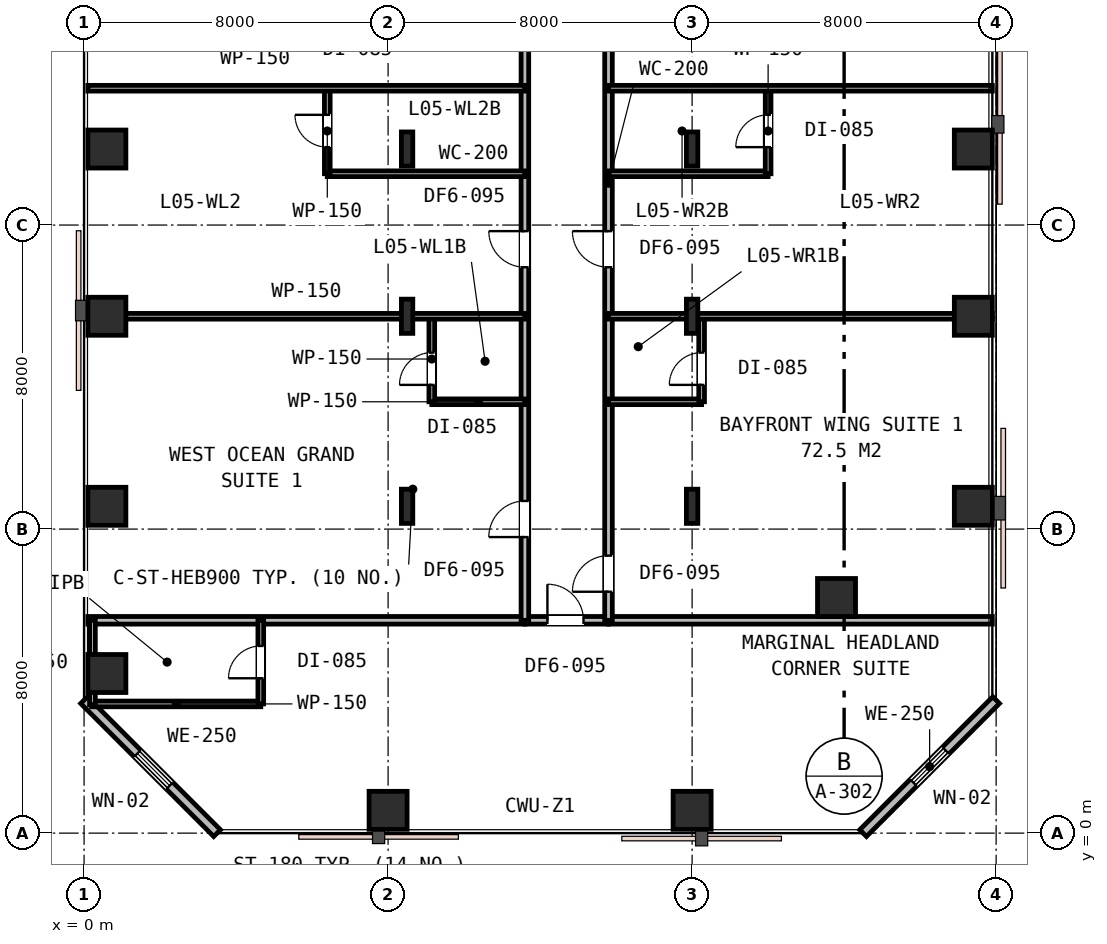
"""IFC4 building model, lengths in metres.
Left out: names, types, materials, properties, quantities, classifications, styles, units other than length and angle.
Written with IfcOpenShell. Run it as: python <this file> out.ifc"""

import sys

from ifc_helpers import new_model, si_unit, direction, frame, frame_2d, origin, origin_2d, place, context, subcontext, project, spatial, rectangle, i_section, extrude, element, fill, save


model = new_model("IFC4")
c1 = context("Model", 3, precision=1e-05, world=origin(), true_north=direction((0.0, 1.0)))
c2 = subcontext(c1, "Body", "Model", "MODEL_VIEW")
j1 = project(units=[si_unit("LENGTHUNIT", "METRE"), si_unit("PLANEANGLEUNIT", "RADIAN")], contexts=[c1])
p1 = place(None, origin())
s1 = spatial("IfcSite", under=j1, at=p1, CompositionType="ELEMENT")
p2 = place(p1, origin())
s2 = spatial("IfcBuilding", under=s1, at=p2, CompositionType="ELEMENT")
p3 = place(p2, frame((0.0, 0.0, 25.8)))
s3 = spatial("IfcBuildingStorey", under=s2, at=p3, CompositionType="ELEMENT", Elevation=25.8)
for number, where, z_axis, x_axis in (
    (1, (0.6, 8.6, 0.0), (0.0, 0.0, 1.0), (1.0, 0.0, 0.0)),
    (2, (0.6, 13.6, 0.0), (0.0, 0.0, 1.0), (1.0, 0.0, 0.0)),
    (3, (0.6, 18.0, 0.0), (0.0, 0.0, 1.0), (1.0, 0.0, 0.0)),
    (4, (0.6, 4.2, 0.0), (0.0, 0.0, 1.0), (1.0, 0.0, 0.0)),
    (5, (8.0, 0.6, 0.0), (0.0, 0.0, 1.0), (1.0, 0.0, 0.0)),
    (6, (16.0, 0.6, 0.0), (0.0, 0.0, 1.0), (1.0, 0.0, 0.0)),
    (7, (19.8, 6.2, 0.0), (0.0, 0.0, 1.0), (1.0, 0.0, 0.0)),
    (8, (23.4, 8.6, 0.0), (0.0, 0.0, 1.0), (1.0, 0.0, 0.0)),
    (9, (23.4, 13.6, 0.0), (0.0, 0.0, 1.0), (1.0, 0.0, 0.0)),
    (10, (23.4, 18.0, 0.0), (0.0, 0.0, 1.0), (1.0, 0.0, 0.0)),
):
    element("IfcColumn", number, at=place(p3, frame(where, z_axis=z_axis, x_axis=x_axis)), inside=s3, PredefinedType="COLUMN", context=c2, shape_type="SweptSolid", body=[
        extrude(rectangle(XDim=1.0, YDim=1.0, at=origin_2d()), origin(), (0.0, 0.0, 1.0), 3.6),
    ])
for number, where, z_axis, x_axis in (
    (11, (8.5, 8.6, 0.0), (0.0, 0.0, 1.0), (1.0, 0.0, 0.0)),
    (12, (16.0, 8.6, 0.0), (0.0, 0.0, 1.0), (1.0, 0.0, 0.0)),
    (13, (8.5, 13.6, 0.0), (0.0, 0.0, 1.0), (1.0, 0.0, 0.0)),
    (14, (16.0, 13.6, 0.0), (0.0, 0.0, 1.0), (1.0, 0.0, 0.0)),
    (15, (8.5, 18.0, 0.0), (0.0, 0.0, 1.0), (1.0, 0.0, 0.0)),
    (16, (16.0, 18.0, 0.0), (0.0, 0.0, 1.0), (1.0, 0.0, 0.0)),
):
    element("IfcColumn", number, at=place(p3, frame(where, z_axis=z_axis, x_axis=x_axis)), inside=s3, PredefinedType="COLUMN", context=c2, shape_type="SweptSolid", body=[
        extrude(i_section(OverallWidth=0.3, OverallDepth=0.9, WebThickness=0.018, FlangeThickness=0.035, FilletRadius=0.03, at=origin_2d()), origin(), (0.0, 0.0, 1.0), 3.6),
    ])
p4 = place(p3, frame((20.5, 0.0, 0.0), z_axis=(0.0, 0.0, 1.0), x_axis=(0.707106781187, 0.707106781187, 0.0)))
e17 = element("IfcWall", 17, at=p4, inside=s3, PredefinedType="STANDARD", context=c2, shape_type="SweptSolid", body=[
    extrude(rectangle(XDim=4.95, YDim=0.25, at=frame_2d((2.475, 0.0))), origin(), (0.0, 0.0, 1.0), 3.33),
])
p5 = place(p4, frame((1.875, 0.0, 0.85)))
e18 = element("IfcOpeningElement", 18, at=p5, cuts=e17, PredefinedType="OPENING", context=c2, shape_type="SweptSolid", body=[
    extrude(rectangle(XDim=1.2, YDim=1.6, at=frame_2d((0.6, 0.8))), frame((0.0, 0.135, 0.0), z_axis=(0.0, -1.0, 0.0), x_axis=(1.0, 0.0, 0.0)), (0.0, 0.0, 1.0), 0.27),
])
p6 = place(p3, frame((0.0, 3.5, 0.0), z_axis=(0.0, 0.0, 1.0), x_axis=(0.707106781187, -0.707106781187, 0.0)))
e19 = element("IfcWall", 19, at=p6, inside=s3, PredefinedType="STANDARD", context=c2, shape_type="SweptSolid", body=[
    extrude(rectangle(XDim=4.95, YDim=0.25, at=frame_2d((2.475, 0.0))), origin(), (0.0, 0.0, 1.0), 3.33),
])
p7 = place(p6, frame((1.985, 0.0, 0.85)))
e20 = element("IfcOpeningElement", 20, at=p7, cuts=e19, PredefinedType="OPENING", context=c2, shape_type="SweptSolid", body=[
    extrude(rectangle(XDim=1.2, YDim=1.6, at=frame_2d((0.6, 0.8))), frame((0.0, 0.135, 0.0), z_axis=(0.0, -1.0, 0.0), x_axis=(1.0, 0.0, 0.0)), (0.0, 0.0, 1.0), 0.27),
])
p8 = place(p3, frame((0.1, 5.6, 0.0), z_axis=(0.0, 0.0, 1.0), x_axis=(1.0, 0.0, 0.0)))
e21 = element("IfcWall", 21, at=p8, inside=s3, PredefinedType="PARTITIONING", context=c2, shape_type="SweptSolid", body=[
    extrude(rectangle(XDim=11.5, YDim=0.2, at=frame_2d((5.75, 0.0))), origin(), (0.0, 0.0, 1.0), 2.87),
])
p9 = place(p3, frame((13.8, 5.6, 0.0), z_axis=(0.0, 0.0, 1.0), x_axis=(1.0, 0.0, 0.0)))
e22 = element("IfcWall", 22, at=p9, inside=s3, PredefinedType="PARTITIONING", context=c2, shape_type="SweptSolid", body=[
    extrude(rectangle(XDim=10.1, YDim=0.2, at=frame_2d((5.05, 0.0))), origin(), (0.0, 0.0, 1.0), 2.68),
])
p10 = place(p3, frame((11.6, 5.6, 0.0), z_axis=(0.0, 0.0, 1.0), x_axis=(1.0, 0.0, 0.0)))
e23 = element("IfcWall", 23, at=p10, inside=s3, PredefinedType="PARTITIONING", context=c2, shape_type="SweptSolid", body=[
    extrude(rectangle(XDim=2.2, YDim=0.2, at=frame_2d((1.1, 0.0))), origin(), (0.0, 0.0, 1.0), 3.33),
])
p11 = place(p10, frame((0.593, 0.0, 0.0)))
e24 = element("IfcOpeningElement", 24, at=p11, cuts=e23, PredefinedType="OPENING", context=c2, shape_type="SweptSolid", body=[
    extrude(rectangle(XDim=0.95, YDim=2.15, at=frame_2d((0.475, 1.075))), frame((0.0, 0.11, 0.0), z_axis=(0.0, -1.0, 0.0), x_axis=(1.0, 0.0, 0.0)), (0.0, 0.0, 1.0), 0.22),
])
p12 = place(p3, frame((0.2, 3.4, 0.0), z_axis=(0.0, 0.0, 1.0), x_axis=(1.0, 0.0, 0.0)))
e25 = element("IfcWall", 25, at=p12, inside=s3, PredefinedType="PARTITIONING", context=c2, shape_type="SweptSolid", body=[
    extrude(rectangle(XDim=4.45, YDim=0.15, at=frame_2d((2.225, 0.0))), origin(), (0.0, 0.0, 1.0), 3.33),
])
p13 = place(p3, frame((4.65, 3.4, 0.0), z_axis=(0.0, 0.0, 1.0), x_axis=(0.0, 1.0, 0.0)))
e26 = element("IfcWall", 26, at=p13, inside=s3, PredefinedType="PARTITIONING", context=c2, shape_type="SweptSolid", body=[
    extrude(rectangle(XDim=2.2, YDim=0.15, at=frame_2d((1.1, 0.0))), origin(), (0.0, 0.0, 1.0), 3.33),
])
p14 = place(p13, frame((0.675, 0.0, 0.0)))
e27 = element("IfcOpeningElement", 27, at=p14, cuts=e26, PredefinedType="OPENING", context=c2, shape_type="SweptSolid", body=[
    extrude(rectangle(XDim=0.85, YDim=2.15, at=frame_2d((0.425, 1.075))), frame((0.0, 0.085, 0.0), z_axis=(0.0, -1.0, 0.0), x_axis=(1.0, 0.0, 0.0)), (0.0, 0.0, 1.0), 0.17),
])
p15 = place(p3, frame((0.22, 3.38, 0.0), z_axis=(0.0, 0.0, 1.0), x_axis=(0.0, 1.0, 0.0)))
e28 = element("IfcWall", 28, at=p15, inside=s3, PredefinedType="PARTITIONING", context=c2, shape_type="SweptSolid", body=[
    extrude(rectangle(XDim=2.22, YDim=0.15, at=frame_2d((1.11, 0.0))), origin(), (0.0, 0.0, 1.0), 2.87),
])
p16 = place(p3, frame((11.6, 5.6, 0.0), z_axis=(0.0, 0.0, 1.0), x_axis=(0.0, 1.0, 0.0)))
e29 = element("IfcWall", 29, at=p16, inside=s3, PredefinedType="PARTITIONING", context=c2, shape_type="SweptSolid", body=[
    extrude(rectangle(XDim=23.0, YDim=0.2, at=frame_2d((11.5, 0.0))), origin(), (0.0, 0.0, 1.0), 2.68),
])
p17 = place(p16, frame((2.19, 0.0, 0.0)))
e30 = element("IfcOpeningElement", 30, at=p17, cuts=e29, PredefinedType="OPENING", context=c2, shape_type="SweptSolid", body=[
    extrude(rectangle(XDim=0.95, YDim=2.15, at=frame_2d((0.475, 1.075))), frame((0.0, 0.11, 0.0), z_axis=(0.0, -1.0, 0.0), x_axis=(1.0, 0.0, 0.0)), (0.0, 0.0, 1.0), 0.22),
])
p18 = place(p16, frame((9.29, 0.0, 0.0)))
e31 = element("IfcOpeningElement", 31, at=p18, cuts=e29, PredefinedType="OPENING", context=c2, shape_type="SweptSolid", body=[
    extrude(rectangle(XDim=0.95, YDim=2.15, at=frame_2d((0.475, 1.075))), frame((0.0, 0.11, 0.0), z_axis=(0.0, -1.0, 0.0), x_axis=(1.0, 0.0, 0.0)), (0.0, 0.0, 1.0), 0.22),
])
p19 = place(p16, frame((16.64, 0.0, 0.0)))
e32 = element("IfcOpeningElement", 32, at=p19, cuts=e29, PredefinedType="OPENING", context=c2, shape_type="SweptSolid", body=[
    extrude(rectangle(XDim=0.95, YDim=2.15, at=frame_2d((0.475, 1.075))), frame((0.0, 0.11, 0.0), z_axis=(0.0, -1.0, 0.0), x_axis=(1.0, 0.0, 0.0)), (0.0, 0.0, 1.0), 0.22),
])
p20 = place(p3, frame((9.15, 11.35, 0.0), z_axis=(0.0, 0.0, 1.0), x_axis=(1.0, 0.0, 0.0)))
e33 = element("IfcWall", 33, at=p20, inside=s3, PredefinedType="PARTITIONING", context=c2, shape_type="SweptSolid", body=[
    extrude(rectangle(XDim=2.45, YDim=0.15, at=frame_2d((1.225, 0.0))), origin(), (0.0, 0.0, 1.0), 2.92),
])
p21 = place(p3, frame((9.15, 11.35, 0.0), z_axis=(0.0, 0.0, 1.0), x_axis=(0.0, 1.0, 0.0)))
e34 = element("IfcWall", 34, at=p21, inside=s3, PredefinedType="PARTITIONING", context=c2, shape_type="SweptSolid", body=[
    extrude(rectangle(XDim=2.25, YDim=0.15, at=frame_2d((1.125, 0.0))), origin(), (0.0, 0.0, 1.0), 2.68),
])
p22 = place(p21, frame((0.444, 0.0, 0.0)))
e35 = element("IfcOpeningElement", 35, at=p22, cuts=e34, PredefinedType="OPENING", context=c2, shape_type="SweptSolid", body=[
    extrude(rectangle(XDim=0.85, YDim=2.15, at=frame_2d((0.425, 1.075))), frame((0.0, 0.085, 0.0), z_axis=(0.0, -1.0, 0.0), x_axis=(1.0, 0.0, 0.0)), (0.0, 0.0, 1.0), 0.17),
])
p23 = place(p3, frame((0.1, 13.6, 0.0), z_axis=(0.0, 0.0, 1.0), x_axis=(1.0, 0.0, 0.0)))
e36 = element("IfcWall", 36, at=p23, inside=s3, PredefinedType="PARTITIONING", context=c2, shape_type="SweptSolid", body=[
    extrude(rectangle(XDim=11.5, YDim=0.15, at=frame_2d((5.75, 0.0))), origin(), (0.0, 0.0, 1.0), 2.68),
])
p24 = place(p3, frame((13.8, 5.6, 0.0), z_axis=(0.0, 0.0, 1.0), x_axis=(0.0, 1.0, 0.0)))
e37 = element("IfcWall", 37, at=p24, inside=s3, PredefinedType="PARTITIONING", context=c2, shape_type="SweptSolid", body=[
    extrude(rectangle(XDim=23.0, YDim=0.2, at=frame_2d((11.5, 0.0))), origin(), (0.0, 0.0, 1.0), 2.68),
])
p25 = place(p24, frame((0.752, 0.0, 0.0)))
e38 = element("IfcOpeningElement", 38, at=p25, cuts=e37, PredefinedType="OPENING", context=c2, shape_type="SweptSolid", body=[
    extrude(rectangle(XDim=0.95, YDim=2.15, at=frame_2d((0.475, 1.075))), frame((0.0, 0.11, 0.0), z_axis=(0.0, -1.0, 0.0), x_axis=(1.0, 0.0, 0.0)), (0.0, 0.0, 1.0), 0.22),
])
p26 = place(p24, frame((9.29, 0.0, 0.0)))
e39 = element("IfcOpeningElement", 39, at=p26, cuts=e37, PredefinedType="OPENING", context=c2, shape_type="SweptSolid", body=[
    extrude(rectangle(XDim=0.95, YDim=2.15, at=frame_2d((0.475, 1.075))), frame((0.0, 0.11, 0.0), z_axis=(0.0, -1.0, 0.0), x_axis=(1.0, 0.0, 0.0)), (0.0, 0.0, 1.0), 0.22),
])
p27 = place(p24, frame((16.494, 0.0, 0.0)))
e40 = element("IfcOpeningElement", 40, at=p27, cuts=e37, PredefinedType="OPENING", context=c2, shape_type="SweptSolid", body=[
    extrude(rectangle(XDim=0.95, YDim=2.15, at=frame_2d((0.475, 1.075))), frame((0.0, 0.11, 0.0), z_axis=(0.0, -1.0, 0.0), x_axis=(1.0, 0.0, 0.0)), (0.0, 0.0, 1.0), 0.22),
])
p28 = place(p3, frame((13.8, 11.35, 0.0), z_axis=(0.0, 0.0, 1.0), x_axis=(1.0, 0.0, 0.0)))
e41 = element("IfcWall", 41, at=p28, inside=s3, PredefinedType="PARTITIONING", context=c2, shape_type="SweptSolid", body=[
    extrude(rectangle(XDim=2.45, YDim=0.15, at=frame_2d((1.225, 0.0))), origin(), (0.0, 0.0, 1.0), 2.68),
])
p29 = place(p3, frame((16.25, 11.35, 0.0), z_axis=(0.0, 0.0, 1.0), x_axis=(0.0, 1.0, 0.0)))
e42 = element("IfcWall", 42, at=p29, inside=s3, PredefinedType="PARTITIONING", context=c2, shape_type="SweptSolid", body=[
    extrude(rectangle(XDim=2.25, YDim=0.15, at=frame_2d((1.125, 0.0))), origin(), (0.0, 0.0, 1.0), 2.68),
])
p30 = place(p29, frame((0.444, 0.0, 0.0)))
e43 = element("IfcOpeningElement", 43, at=p30, cuts=e42, PredefinedType="OPENING", context=c2, shape_type="SweptSolid", body=[
    extrude(rectangle(XDim=0.85, YDim=2.15, at=frame_2d((0.425, 1.075))), frame((0.0, 0.085, 0.0), z_axis=(0.0, -1.0, 0.0), x_axis=(1.0, 0.0, 0.0)), (0.0, 0.0, 1.0), 0.17),
])
p31 = place(p3, frame((13.8, 13.6, 0.0), z_axis=(0.0, 0.0, 1.0), x_axis=(1.0, 0.0, 0.0)))
e44 = element("IfcWall", 44, at=p31, inside=s3, PredefinedType="PARTITIONING", context=c2, shape_type="SweptSolid", body=[
    extrude(rectangle(XDim=10.1, YDim=0.15, at=frame_2d((5.05, 0.0))), origin(), (0.0, 0.0, 1.0), 2.68),
])
p32 = place(p3, frame((6.4, 17.35, 0.0), z_axis=(0.0, 0.0, 1.0), x_axis=(1.0, 0.0, 0.0)))
e45 = element("IfcWall", 45, at=p32, inside=s3, PredefinedType="PARTITIONING", context=c2, shape_type="SweptSolid", body=[
    extrude(rectangle(XDim=5.2, YDim=0.15, at=frame_2d((2.6, 0.0))), origin(), (0.0, 0.0, 1.0), 2.68),
])
p33 = place(p3, frame((6.4, 17.35, 0.0), z_axis=(0.0, 0.0, 1.0), x_axis=(0.0, 1.0, 0.0)))
e46 = element("IfcWall", 46, at=p33, inside=s3, PredefinedType="PARTITIONING", context=c2, shape_type="SweptSolid", body=[
    extrude(rectangle(XDim=2.25, YDim=0.15, at=frame_2d((1.125, 0.0))), origin(), (0.0, 0.0, 1.0), 2.68),
])
p34 = place(p33, frame((0.7, 0.0, 0.0)))
e47 = element("IfcOpeningElement", 47, at=p34, cuts=e46, PredefinedType="OPENING", context=c2, shape_type="SweptSolid", body=[
    extrude(rectangle(XDim=0.85, YDim=2.15, at=frame_2d((0.425, 1.075))), frame((0.0, 0.085, 0.0), z_axis=(0.0, -1.0, 0.0), x_axis=(1.0, 0.0, 0.0)), (0.0, 0.0, 1.0), 0.17),
])
p35 = place(p3, frame((0.1, 19.6, 0.0), z_axis=(0.0, 0.0, 1.0), x_axis=(1.0, 0.0, 0.0)))
e48 = element("IfcWall", 48, at=p35, inside=s3, PredefinedType="PARTITIONING", context=c2, shape_type="SweptSolid", body=[
    extrude(rectangle(XDim=11.5, YDim=0.15, at=frame_2d((5.75, 0.0))), origin(), (0.0, 0.0, 1.0), 2.68),
])
p36 = place(p3, frame((13.8, 17.35, 0.0), z_axis=(0.0, 0.0, 1.0), x_axis=(1.0, 0.0, 0.0)))
e49 = element("IfcWall", 49, at=p36, inside=s3, PredefinedType="PARTITIONING", context=c2, shape_type="SweptSolid", body=[
    extrude(rectangle(XDim=4.2, YDim=0.15, at=frame_2d((2.1, 0.0))), origin(), (0.0, 0.0, 1.0), 2.68),
])
p37 = place(p3, frame((18.0, 17.35, 0.0), z_axis=(0.0, 0.0, 1.0), x_axis=(0.0, 1.0, 0.0)))
e50 = element("IfcWall", 50, at=p37, inside=s3, PredefinedType="PARTITIONING", context=c2, shape_type="SweptSolid", body=[
    extrude(rectangle(XDim=2.25, YDim=0.15, at=frame_2d((1.125, 0.0))), origin(), (0.0, 0.0, 1.0), 2.68),
])
p38 = place(p37, frame((0.7, 0.0, 0.0)))
e51 = element("IfcOpeningElement", 51, at=p38, cuts=e50, PredefinedType="OPENING", context=c2, shape_type="SweptSolid", body=[
    extrude(rectangle(XDim=0.85, YDim=2.15, at=frame_2d((0.425, 1.075))), frame((0.0, 0.085, 0.0), z_axis=(0.0, -1.0, 0.0), x_axis=(1.0, 0.0, 0.0)), (0.0, 0.0, 1.0), 0.17),
])
p39 = place(p3, frame((13.8, 19.6, 0.0), z_axis=(0.0, 0.0, 1.0), x_axis=(1.0, 0.0, 0.0)))
e52 = element("IfcWall", 52, at=p39, inside=s3, PredefinedType="PARTITIONING", context=c2, shape_type="SweptSolid", body=[
    extrude(rectangle(XDim=10.1, YDim=0.15, at=frame_2d((5.05, 0.0))), origin(), (0.0, 0.0, 1.0), 2.68),
])
p40 = place(p5, origin())
e53 = element("IfcWindow", 53, at=p40, inside=s3, PartitioningType="SINGLE_PANEL", PredefinedType="WINDOW", context=c2, shape_type="SweptSolid", body=[
    extrude(rectangle(XDim=1.2, YDim=1.6, at=frame_2d((0.6, 0.8))), frame((0.0, 0.03, 0.0), z_axis=(0.0, -1.0, 0.0), x_axis=(1.0, 0.0, 0.0)), (0.0, 0.0, 1.0), 0.06),
])
fill(e18, e53)
p41 = place(p7, origin())
e54 = element("IfcWindow", 54, at=p41, inside=s3, PartitioningType="SINGLE_PANEL", PredefinedType="WINDOW", context=c2, shape_type="SweptSolid", body=[
    extrude(rectangle(XDim=1.2, YDim=1.6, at=frame_2d((0.6, 0.8))), frame((0.0, 0.03, 0.0), z_axis=(0.0, -1.0, 0.0), x_axis=(1.0, 0.0, 0.0)), (0.0, 0.0, 1.0), 0.06),
])
fill(e20, e54)
p42 = place(p11, origin())
e55 = element("IfcDoor", 55, at=p42, inside=s3, OperationType="SINGLE_SWING_LEFT", PredefinedType="DOOR", context=c2, shape_type="SweptSolid", body=[
    extrude(rectangle(XDim=0.95, YDim=2.15, at=frame_2d((0.475, 1.075))), frame((0.0, 0.025, 0.0), z_axis=(0.0, -1.0, 0.0), x_axis=(1.0, 0.0, 0.0)), (0.0, 0.0, 1.0), 0.05),
])
fill(e24, e55)
p43 = place(p14, origin())
e56 = element("IfcDoor", 56, at=p43, inside=s3, OperationType="SINGLE_SWING_LEFT", PredefinedType="DOOR", context=c2, shape_type="SweptSolid", body=[
    extrude(rectangle(XDim=0.85, YDim=2.15, at=frame_2d((0.425, 1.075))), frame((0.0, 0.025, 0.0), z_axis=(0.0, -1.0, 0.0), x_axis=(1.0, 0.0, 0.0)), (0.0, 0.0, 1.0), 0.05),
])
fill(e27, e56)
p44 = place(p17, origin())
e57 = element("IfcDoor", 57, at=p44, inside=s3, OperationType="SINGLE_SWING_LEFT", PredefinedType="DOOR", context=c2, shape_type="SweptSolid", body=[
    extrude(rectangle(XDim=0.95, YDim=2.15, at=frame_2d((0.475, 1.075))), frame((0.0, 0.025, 0.0), z_axis=(0.0, -1.0, 0.0), x_axis=(1.0, 0.0, 0.0)), (0.0, 0.0, 1.0), 0.05),
])
fill(e30, e57)
p45 = place(p22, origin())
e58 = element("IfcDoor", 58, at=p45, inside=s3, OperationType="SINGLE_SWING_LEFT", PredefinedType="DOOR", context=c2, shape_type="SweptSolid", body=[
    extrude(rectangle(XDim=0.85, YDim=2.15, at=frame_2d((0.425, 1.075))), frame((0.0, 0.025, 0.0), z_axis=(0.0, -1.0, 0.0), x_axis=(1.0, 0.0, 0.0)), (0.0, 0.0, 1.0), 0.05),
])
fill(e35, e58)
p46 = place(p25, origin())
e59 = element("IfcDoor", 59, at=p46, inside=s3, OperationType="SINGLE_SWING_LEFT", PredefinedType="DOOR", context=c2, shape_type="SweptSolid", body=[
    extrude(rectangle(XDim=0.95, YDim=2.15, at=frame_2d((0.475, 1.075))), frame((0.0, 0.025, 0.0), z_axis=(0.0, -1.0, 0.0), x_axis=(1.0, 0.0, 0.0)), (0.0, 0.0, 1.0), 0.05),
])
fill(e38, e59)
p47 = place(p30, origin())
e60 = element("IfcDoor", 60, at=p47, inside=s3, OperationType="SINGLE_SWING_LEFT", PredefinedType="DOOR", context=c2, shape_type="SweptSolid", body=[
    extrude(rectangle(XDim=0.85, YDim=2.15, at=frame_2d((0.425, 1.075))), frame((0.0, 0.025, 0.0), z_axis=(0.0, -1.0, 0.0), x_axis=(1.0, 0.0, 0.0)), (0.0, 0.0, 1.0), 0.05),
])
fill(e43, e60)
p48 = place(p18, origin())
e61 = element("IfcDoor", 61, at=p48, inside=s3, OperationType="SINGLE_SWING_RIGHT", PredefinedType="DOOR", context=c2, shape_type="SweptSolid", body=[
    extrude(rectangle(XDim=0.95, YDim=2.15, at=frame_2d((0.475, 1.075))), frame((0.0, 0.025, 0.0), z_axis=(0.0, -1.0, 0.0), x_axis=(1.0, 0.0, 0.0)), (0.0, 0.0, 1.0), 0.05),
])
fill(e31, e61)
p49 = place(p34, origin())
e62 = element("IfcDoor", 62, at=p49, inside=s3, OperationType="SINGLE_SWING_RIGHT", PredefinedType="DOOR", context=c2, shape_type="SweptSolid", body=[
    extrude(rectangle(XDim=0.85, YDim=2.15, at=frame_2d((0.425, 1.075))), frame((0.0, 0.025, 0.0), z_axis=(0.0, -1.0, 0.0), x_axis=(1.0, 0.0, 0.0)), (0.0, 0.0, 1.0), 0.05),
])
fill(e47, e62)
p50 = place(p26, origin())
e63 = element("IfcDoor", 63, at=p50, inside=s3, OperationType="SINGLE_SWING_RIGHT", PredefinedType="DOOR", context=c2, shape_type="SweptSolid", body=[
    extrude(rectangle(XDim=0.95, YDim=2.15, at=frame_2d((0.475, 1.075))), frame((0.0, 0.025, 0.0), z_axis=(0.0, -1.0, 0.0), x_axis=(1.0, 0.0, 0.0)), (0.0, 0.0, 1.0), 0.05),
])
fill(e39, e63)
p51 = place(p38, origin())
e64 = element("IfcDoor", 64, at=p51, inside=s3, OperationType="SINGLE_SWING_LEFT", PredefinedType="DOOR", context=c2, shape_type="SweptSolid", body=[
    extrude(rectangle(XDim=0.85, YDim=2.15, at=frame_2d((0.425, 1.075))), frame((0.0, 0.025, 0.0), z_axis=(0.0, -1.0, 0.0), x_axis=(1.0, 0.0, 0.0)), (0.0, 0.0, 1.0), 0.05),
])
fill(e51, e64)
save(model, sys.argv[1])
